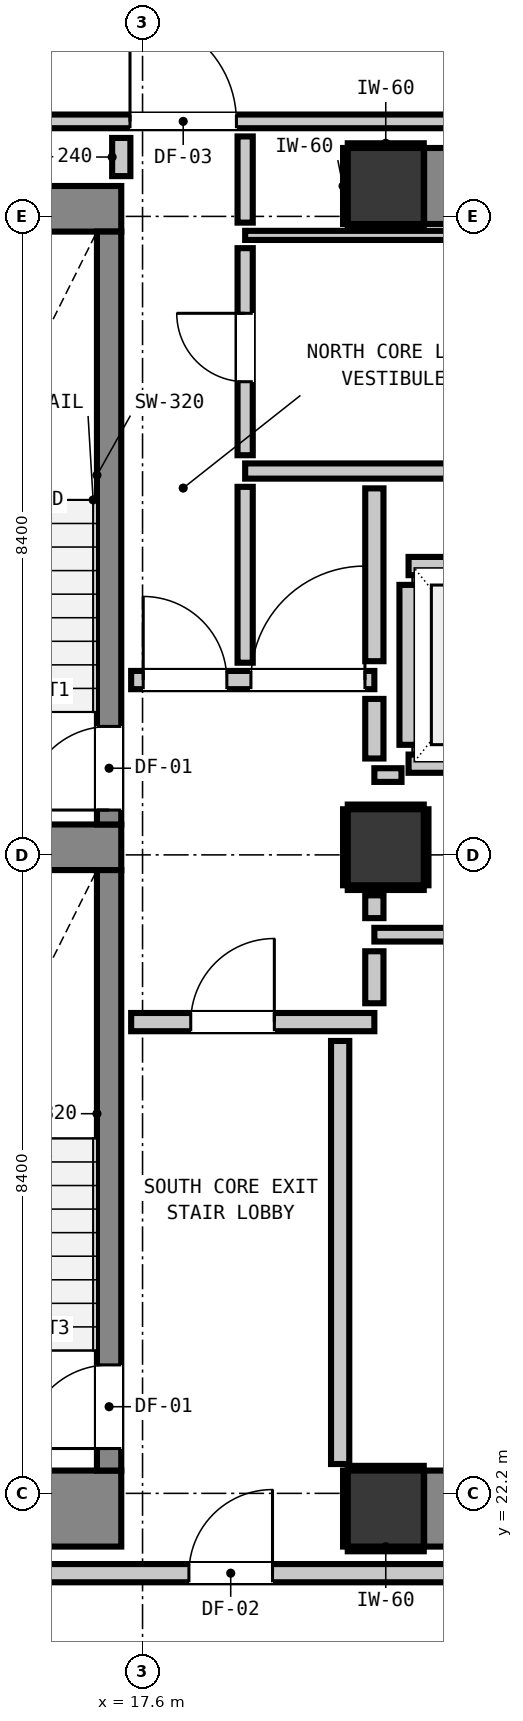
"""IFC4 building model, lengths in metres.
Left out: names, types, materials, properties, quantities, classifications, styles, units other than length and angle.
Written with IfcOpenShell. Run it as: python <this file> out.ifc"""

import sys

from ifc_helpers import new_model, si_unit, direction, frame, frame_2d, origin, origin_2d, place, context, subcontext, project, spatial, rectangle, extrude, element, fill, save


model = new_model("IFC4")
c1 = context("Model", 3, precision=1e-05, world=origin(), true_north=direction((0.0, 1.0)))
c2 = subcontext(c1, "Body", "Model", "MODEL_VIEW")
j1 = project(units=[si_unit("LENGTHUNIT", "METRE"), si_unit("PLANEANGLEUNIT", "RADIAN")], contexts=[c1])
p1 = place(None, origin())
s1 = spatial("IfcSite", under=j1, at=p1, CompositionType="ELEMENT")
p2 = place(p1, origin())
s2 = spatial("IfcBuilding", under=s1, at=p2, CompositionType="ELEMENT")
p3 = place(p2, frame((0.0, 0.0, 109.4)))
s3 = spatial("IfcBuildingStorey", under=s2, at=p3, CompositionType="ELEMENT", Elevation=109.4)
for number, where, z_axis, x_axis in (
    (1, (20.8, 22.0, 0.0), (0.0, 0.0, 1.0), (1.0, 0.0, 0.0)),
    (2, (20.8, 39.4, 0.0), (0.0, 0.0, 1.0), (1.0, 0.0, 0.0)),
):
    element("IfcColumn", number, at=place(p3, frame(where, z_axis=z_axis, x_axis=x_axis)), inside=s3, PredefinedType="COLUMN", context=c2, shape_type="SweptSolid", body=[
        extrude(rectangle(XDim=1.0, YDim=1.0, at=origin_2d()), origin(), (0.0, 0.0, 1.0), 3.32),
    ])
p4 = place(p3, frame((13.24, 22.0, 0.0), z_axis=(0.0, 0.0, 1.0), x_axis=(1.0, 0.0, 0.0)))
e3 = element("IfcWall", 3, at=p4, inside=s3, PredefinedType="SHEAR", context=c2, shape_type="SweptSolid", body=[
    extrude(rectangle(XDim=4.08, YDim=1.0, at=frame_2d((2.04, 0.0))), origin(), (0.0, 0.0, 1.0), 3.32),
])
p5 = place(p3, frame((13.24, 39.1, 0.0), z_axis=(0.0, 0.0, 1.0), x_axis=(1.0, 0.0, 0.0)))
e4 = element("IfcWall", 4, at=p5, inside=s3, PredefinedType="SHEAR", context=c2, shape_type="SweptSolid", body=[
    extrude(rectangle(XDim=4.08, YDim=0.6, at=frame_2d((2.04, 0.0))), origin(), (0.0, 0.0, 1.0), 3.32),
])
p6 = place(p3, frame((13.905, 30.7, 0.0), z_axis=(0.0, 0.0, 1.0), x_axis=(1.0, 0.0, 0.0)))
e5 = element("IfcWall", 5, at=p6, inside=s3, PredefinedType="SHEAR", context=c2, shape_type="SweptSolid", body=[
    extrude(rectangle(XDim=3.415, YDim=0.6, at=frame_2d((1.708, 0.0))), origin(), (0.0, 0.0, 1.0), 3.32),
])
for number, where, z_axis, x_axis in (
    (6, (21.305, 22.0, 0.0), (0.0, 0.0, 1.0), (1.0, 0.0, 0.0)),
    (7, (21.305, 39.4, 0.0), (0.0, 0.0, 1.0), (1.0, 0.0, 0.0)),
):
    element("IfcWall", number, at=place(p3, frame(where, z_axis=z_axis, x_axis=x_axis)), inside=s3, PredefinedType="SHEAR", context=c2, shape_type="SweptSolid", body=[
        extrude(rectangle(XDim=7.39, YDim=1.0, at=frame_2d((3.695, 0.0))), origin(), (0.0, 0.0, 1.0), 3.32),
    ])
p7 = place(p3, frame((17.16, 31.0, 0.0), z_axis=(0.0, 0.0, 1.0), x_axis=(0.0, 1.0, 0.0)))
e8 = element("IfcWall", 8, at=p7, inside=s3, PredefinedType="SHEAR", context=c2, shape_type="SweptSolid", body=[
    extrude(rectangle(XDim=7.8, YDim=0.32, at=frame_2d((3.9, 0.0))), origin(), (0.0, 0.0, 1.0), 3.32),
])
p8 = place(p7, frame((0.19, 0.0, 0.0)))
e9 = element("IfcOpeningElement", 9, at=p8, cuts=e8, PredefinedType="OPENING", context=c2, shape_type="SweptSolid", body=[
    extrude(rectangle(XDim=1.1, YDim=2.15, at=frame_2d((0.55, 1.075))), frame((0.0, 0.17, 0.0), z_axis=(0.0, -1.0, 0.0), x_axis=(1.0, 0.0, 0.0)), (0.0, 0.0, 1.0), 0.34),
])
p9 = place(p3, frame((17.16, 22.5, 0.0), z_axis=(0.0, 0.0, 1.0), x_axis=(0.0, 1.0, 0.0)))
e10 = element("IfcWall", 10, at=p9, inside=s3, PredefinedType="SHEAR", context=c2, shape_type="SweptSolid", body=[
    extrude(rectangle(XDim=7.9, YDim=0.32, at=frame_2d((3.95, 0.0))), origin(), (0.0, 0.0, 1.0), 3.32),
])
p10 = place(p9, frame((0.29, 0.0, 0.0)))
e11 = element("IfcOpeningElement", 11, at=p10, cuts=e10, PredefinedType="OPENING", context=c2, shape_type="SweptSolid", body=[
    extrude(rectangle(XDim=1.1, YDim=2.15, at=frame_2d((0.55, 1.075))), frame((0.0, 0.17, 0.0), z_axis=(0.0, -1.0, 0.0), x_axis=(1.0, 0.0, 0.0)), (0.0, 0.0, 1.0), 0.34),
])
p11 = place(p3, frame((20.8, 30.7, 0.0), z_axis=(0.0, 0.0, 1.0), x_axis=(1.0, 0.0, 0.0)))
e12 = element("IfcColumn", 12, at=p11, inside=s3, PredefinedType="COLUMN", context=c2, shape_type="SweptSolid", body=[
    extrude(rectangle(XDim=1.0, YDim=1.0, at=origin_2d()), origin(), (0.0, 0.0, 1.0), 3.32),
])
for number, where, z_axis, x_axis in (
    (13, (21.1, 31.8, 0.0), (0.0, 0.0, 1.0), (1.0, 0.0, 0.0)),
    (14, (21.1, 34.4, 0.0), (0.0, 0.0, 1.0), (1.0, 0.0, 0.0)),
):
    element("IfcWall", number, at=place(p3, frame(where, z_axis=z_axis, x_axis=x_axis)), inside=s3, PredefinedType="PARTITIONING", context=c2, shape_type="SweptSolid", body=[
        extrude(rectangle(XDim=2.2, YDim=0.24, at=frame_2d((1.1, 0.0))), origin(), (0.0, 0.0, 1.0), 3.08),
    ])
p12 = place(p3, frame((21.1, 32.048, 0.0), z_axis=(0.0, 0.0, 1.0), x_axis=(0.0, 1.0, 0.0)))
e15 = element("IfcWall", 15, at=p12, inside=s3, PredefinedType="PARTITIONING", context=c2, shape_type="SweptSolid", body=[
    extrude(rectangle(XDim=2.104, YDim=0.24, at=frame_2d((1.052, 0.0))), origin(), (0.0, 0.0, 1.0), 2.315),
])
p13 = place(p3, frame((3.207, 21.15, 0.0), z_axis=(0.0, 0.0, 1.0), x_axis=(1.0, 0.0, 0.0)))
e16 = element("IfcWall", 16, at=p13, inside=s3, PredefinedType="PARTITIONING", context=c2, shape_type="SweptSolid", body=[
    extrude(rectangle(XDim=39.386, YDim=0.24, at=frame_2d((19.693, 0.0))), origin(), (0.0, 0.0, 1.0), 3.08),
])
p14 = place(p13, frame((15.003, 0.0, 0.0)))
e17 = element("IfcOpeningElement", 17, at=p14, cuts=e16, PredefinedType="OPENING", context=c2, shape_type="SweptSolid", body=[
    extrude(rectangle(XDim=1.1, YDim=2.15, at=frame_2d((0.55, 1.075))), frame((0.0, 0.13, 0.0), z_axis=(0.0, -1.0, 0.0), x_axis=(1.0, 0.0, 0.0)), (0.0, 0.0, 1.0), 0.26),
])
p15 = place(p13, frame((7.243, 0.0, 0.0)))
e18 = element("IfcOpeningElement", 18, at=p15, cuts=e16, PredefinedType="OPENING", context=c2, shape_type="SweptSolid", body=[
    extrude(rectangle(XDim=1.4, YDim=2.15, at=frame_2d((0.7, 1.075))), frame((0.0, 0.13, 0.0), z_axis=(0.0, -1.0, 0.0), x_axis=(1.0, 0.0, 0.0)), (0.0, 0.0, 1.0), 0.26),
])
p16 = place(p13, frame((34.843, 0.0, 0.0)))
e19 = element("IfcOpeningElement", 19, at=p16, cuts=e16, PredefinedType="OPENING", context=c2, shape_type="SweptSolid", body=[
    extrude(rectangle(XDim=1.4, YDim=2.15, at=frame_2d((0.7, 1.075))), frame((0.0, 0.13, 0.0), z_axis=(0.0, -1.0, 0.0), x_axis=(1.0, 0.0, 0.0)), (0.0, 0.0, 1.0), 0.26),
])
p17 = place(p3, frame((17.45, 28.4, 0.0), z_axis=(0.0, 0.0, 1.0), x_axis=(1.0, 0.0, 0.0)))
e20 = element("IfcWall", 20, at=p17, inside=s3, PredefinedType="PARTITIONING", context=c2, shape_type="SweptSolid", body=[
    extrude(rectangle(XDim=3.2, YDim=0.24, at=frame_2d((1.6, 0.0))), origin(), (0.0, 0.0, 1.0), 3.08),
])
p18 = place(p17, frame((0.784, 0.0, 0.0)))
e21 = element("IfcOpeningElement", 21, at=p18, cuts=e20, PredefinedType="OPENING", context=c2, shape_type="SweptSolid", body=[
    extrude(rectangle(XDim=1.1, YDim=2.15, at=frame_2d((0.55, 1.075))), frame((0.0, 0.13, 0.0), z_axis=(0.0, -1.0, 0.0), x_axis=(1.0, 0.0, 0.0)), (0.0, 0.0, 1.0), 0.26),
])
p19 = place(p3, frame((17.45, 32.9, 0.0), z_axis=(0.0, 0.0, 1.0), x_axis=(1.0, 0.0, 0.0)))
e22 = element("IfcWall", 22, at=p19, inside=s3, PredefinedType="PARTITIONING", context=c2, shape_type="SweptSolid", body=[
    extrude(rectangle(XDim=3.2, YDim=0.24, at=frame_2d((1.6, 0.0))), origin(), (0.0, 0.0, 1.0), 3.08),
])
p20 = place(p19, frame((0.159, 0.0, 0.0)))
e23 = element("IfcOpeningElement", 23, at=p20, cuts=e22, PredefinedType="OPENING", context=c2, shape_type="SweptSolid", body=[
    extrude(rectangle(XDim=1.1, YDim=2.15, at=frame_2d((0.55, 1.075))), frame((0.0, 0.13, 0.0), z_axis=(0.0, -1.0, 0.0), x_axis=(1.0, 0.0, 0.0)), (0.0, 0.0, 1.0), 0.26),
])
p21 = place(p19, frame((1.576, 0.0, 0.0)))
e24 = element("IfcOpeningElement", 24, at=p21, cuts=e22, PredefinedType="OPENING", context=c2, shape_type="SweptSolid", body=[
    extrude(rectangle(XDim=1.5, YDim=2.15, at=frame_2d((0.75, 1.075))), frame((0.0, 0.13, 0.0), z_axis=(0.0, -1.0, 0.0), x_axis=(1.0, 0.0, 0.0)), (0.0, 0.0, 1.0), 0.26),
])
p22 = place(p3, frame((18.95, 35.65, 0.0), z_axis=(0.0, 0.0, 1.0), x_axis=(1.0, 0.0, 0.0)))
e25 = element("IfcWall", 25, at=p22, inside=s3, PredefinedType="PARTITIONING", context=c2, shape_type="SweptSolid", body=[
    extrude(rectangle(XDim=11.025, YDim=0.2, at=frame_2d((5.513, 0.0))), origin(), (0.0, 0.0, 1.0), 3.08),
])
p23 = place(p3, frame((20.65, 29.55, 0.0), z_axis=(0.0, 0.0, 1.0), x_axis=(1.0, 0.0, 0.0)))
e26 = element("IfcWall", 26, at=p23, inside=s3, PredefinedType="PARTITIONING", context=c2, shape_type="SweptSolid", body=[
    extrude(rectangle(XDim=9.325, YDim=0.18, at=frame_2d((4.663, 0.0))), origin(), (0.0, 0.0, 1.0), 3.08),
])
p24 = place(p3, frame((20.65, 31.65, 0.0), z_axis=(0.0, 0.0, 1.0), x_axis=(1.0, 0.0, 0.0)))
e27 = element("IfcWall", 27, at=p24, inside=s3, PredefinedType="PARTITIONING", context=c2, shape_type="SweptSolid", body=[
    extrude(rectangle(XDim=0.357, YDim=0.18, at=frame_2d((0.179, 0.0))), origin(), (0.0, 0.0, 1.0), 3.08),
])
p25 = place(p3, frame((12.979, 40.25, 0.0), z_axis=(0.0, 0.0, 1.0), x_axis=(1.0, 0.0, 0.0)))
e28 = element("IfcWall", 28, at=p25, inside=s3, PredefinedType="PARTITIONING", context=c2, shape_type="SweptSolid", body=[
    extrude(rectangle(XDim=29.614, YDim=0.18, at=frame_2d((14.807, 0.0))), origin(), (0.0, 0.0, 1.0), 3.08),
])
p26 = place(p25, frame((4.456, 0.0, 0.0)))
e29 = element("IfcOpeningElement", 29, at=p26, cuts=e28, PredefinedType="OPENING", context=c2, shape_type="SweptSolid", body=[
    extrude(rectangle(XDim=1.4, YDim=2.15, at=frame_2d((0.7, 1.075))), frame((0.0, 0.1, 0.0), z_axis=(0.0, -1.0, 0.0), x_axis=(1.0, 0.0, 0.0)), (0.0, 0.0, 1.0), 0.2),
])
p27 = place(p25, frame((25.071, 0.0, 0.0)))
e30 = element("IfcOpeningElement", 30, at=p27, cuts=e28, PredefinedType="OPENING", context=c2, shape_type="SweptSolid", body=[
    extrude(rectangle(XDim=1.4, YDim=2.15, at=frame_2d((0.7, 1.075))), frame((0.0, 0.1, 0.0), z_axis=(0.0, -1.0, 0.0), x_axis=(1.0, 0.0, 0.0)), (0.0, 0.0, 1.0), 0.2),
])
p28 = place(p3, frame((18.95, 38.75, 0.0), z_axis=(0.0, 0.0, 1.0), x_axis=(1.0, 0.0, 0.0)))
e31 = element("IfcWall", 31, at=p28, inside=s3, PredefinedType="PARTITIONING", context=c2, shape_type="SweptSolid", body=[
    extrude(rectangle(XDim=13.56, YDim=0.12, at=frame_2d((6.78, 0.0))), origin(), (0.0, 0.0, 1.0), 3.08),
])
p29 = place(p3, frame((17.32, 39.53, 0.0), z_axis=(0.0, 0.0, 1.0), x_axis=(0.0, 1.0, 0.0)))
e32 = element("IfcWall", 32, at=p29, inside=s3, PredefinedType="PARTITIONING", context=c2, shape_type="SweptSolid", body=[
    extrude(rectangle(XDim=0.502, YDim=0.24, at=frame_2d((0.251, 0.0))), origin(), (0.0, 0.0, 1.0), 3.08),
])
p30 = place(p3, frame((20.2, 22.586, 0.0), z_axis=(0.0, 0.0, 1.0), x_axis=(0.0, 1.0, 0.0)))
e33 = element("IfcWall", 33, at=p30, inside=s3, PredefinedType="PARTITIONING", context=c2, shape_type="SweptSolid", body=[
    extrude(rectangle(XDim=5.566, YDim=0.24, at=frame_2d((2.783, 0.0))), origin(), (0.0, 0.0, 1.0), 3.08),
])
p31 = place(p3, frame((20.65, 28.648, 0.0), z_axis=(0.0, 0.0, 1.0), x_axis=(0.0, 1.0, 0.0)))
e34 = element("IfcWall", 34, at=p31, inside=s3, PredefinedType="PARTITIONING", context=c2, shape_type="SweptSolid", body=[
    extrude(rectangle(XDim=0.684, YDim=0.24, at=frame_2d((0.342, 0.0))), origin(), (0.0, 0.0, 1.0), 2.315),
])
p32 = place(p3, frame((20.65, 29.768, 0.0), z_axis=(0.0, 0.0, 1.0), x_axis=(0.0, 1.0, 0.0)))
e35 = element("IfcWall", 35, at=p32, inside=s3, PredefinedType="PARTITIONING", context=c2, shape_type="SweptSolid", body=[
    extrude(rectangle(XDim=0.3, YDim=0.24, at=frame_2d((0.15, 0.0))), origin(), (0.0, 0.0, 1.0), 2.315),
])
p33 = place(p3, frame((20.65, 31.868, 0.0), z_axis=(0.0, 0.0, 1.0), x_axis=(0.0, 1.0, 0.0)))
e36 = element("IfcWall", 36, at=p33, inside=s3, PredefinedType="PARTITIONING", context=c2, shape_type="SweptSolid", body=[
    extrude(rectangle(XDim=0.784, YDim=0.24, at=frame_2d((0.392, 0.0))), origin(), (0.0, 0.0, 1.0), 2.315),
])
p34 = place(p3, frame((20.65, 33.148, 0.0), z_axis=(0.0, 0.0, 1.0), x_axis=(0.0, 1.0, 0.0)))
e37 = element("IfcWall", 37, at=p34, inside=s3, PredefinedType="PARTITIONING", context=c2, shape_type="SweptSolid", body=[
    extrude(rectangle(XDim=2.274, YDim=0.24, at=frame_2d((1.137, 0.0))), origin(), (0.0, 0.0, 1.0), 2.315),
])
p35 = place(p3, frame((18.95, 33.128, 0.0), z_axis=(0.0, 0.0, 1.0), x_axis=(0.0, 1.0, 0.0)))
e38 = element("IfcWall", 38, at=p35, inside=s3, PredefinedType="PARTITIONING", context=c2, shape_type="SweptSolid", body=[
    extrude(rectangle(XDim=2.314, YDim=0.2, at=frame_2d((1.157, 0.0))), origin(), (0.0, 0.0, 1.0), 3.08),
])
p36 = place(p3, frame((18.95, 35.858, 0.0), z_axis=(0.0, 0.0, 1.0), x_axis=(0.0, 1.0, 0.0)))
e39 = element("IfcWall", 39, at=p36, inside=s3, PredefinedType="PARTITIONING", context=c2, shape_type="SweptSolid", body=[
    extrude(rectangle(XDim=2.724, YDim=0.2, at=frame_2d((1.362, 0.0))), origin(), (0.0, 0.0, 1.0), 3.08),
])
p37 = place(p36, frame((0.967, 0.0, 0.0)))
e40 = element("IfcOpeningElement", 40, at=p37, cuts=e39, PredefinedType="OPENING", context=c2, shape_type="SweptSolid", body=[
    extrude(rectangle(XDim=0.9, YDim=2.1, at=frame_2d((0.45, 1.05))), frame((0.0, 0.11, 0.0), z_axis=(0.0, -1.0, 0.0), x_axis=(1.0, 0.0, 0.0)), (0.0, 0.0, 1.0), 0.22),
])
p38 = place(p3, frame((18.95, 38.918, 0.0), z_axis=(0.0, 0.0, 1.0), x_axis=(0.0, 1.0, 0.0)))
e41 = element("IfcWall", 41, at=p38, inside=s3, PredefinedType="PARTITIONING", context=c2, shape_type="SweptSolid", body=[
    extrude(rectangle(XDim=1.134, YDim=0.2, at=frame_2d((0.567, 0.0))), origin(), (0.0, 0.0, 1.0), 3.08),
])
for number, where, z_axis, x_axis in (
    (42, (20.3, 21.468, 0.0), (0.0, 0.0, 1.0), (1.0, 0.0, 0.0)),
    (43, (20.3, 22.532, 0.0), (0.0, 0.0, 1.0), (1.0, 0.0, 0.0)),
    (44, (20.268, 21.5, 0.0), (0.0, 0.0, 1.0), (0.0, 1.0, 0.0)),
    (45, (20.3, 38.868, 0.0), (0.0, 0.0, 1.0), (1.0, 0.0, 0.0)),
    (46, (20.3, 39.932, 0.0), (0.0, 0.0, 1.0), (1.0, 0.0, 0.0)),
    (47, (20.268, 38.9, 0.0), (0.0, 0.0, 1.0), (0.0, 1.0, 0.0)),
    (48, (20.3, 30.168, 0.0), (0.0, 0.0, 1.0), (1.0, 0.0, 0.0)),
    (49, (20.3, 31.232, 0.0), (0.0, 0.0, 1.0), (1.0, 0.0, 0.0)),
    (50, (20.268, 30.2, 0.0), (0.0, 0.0, 1.0), (0.0, 1.0, 0.0)),
    (51, (21.332, 30.2, 0.0), (0.0, 0.0, 1.0), (0.0, 1.0, 0.0)),
):
    element("IfcWall", number, at=place(p3, frame(where, z_axis=z_axis, x_axis=x_axis)), inside=s3, PredefinedType="PARTITIONING", context=c2, shape_type="SweptSolid", body=[
        extrude(rectangle(XDim=1.0, YDim=0.06, at=frame_2d((0.5, 0.0))), origin(), (0.0, 0.0, 1.0), 1.45),
    ])
p39 = place(p8, origin())
e52 = element("IfcDoor", 52, at=p39, inside=s3, OperationType="SINGLE_SWING_LEFT", PredefinedType="DOOR", context=c2, shape_type="SweptSolid", body=[
    extrude(rectangle(XDim=1.1, YDim=2.15, at=frame_2d((0.55, 1.075))), frame((0.0, 0.025, 0.0), z_axis=(0.0, -1.0, 0.0), x_axis=(1.0, 0.0, 0.0)), (0.0, 0.0, 1.0), 0.05),
])
fill(e9, e52)
p40 = place(p10, origin())
e53 = element("IfcDoor", 53, at=p40, inside=s3, OperationType="SINGLE_SWING_LEFT", PredefinedType="DOOR", context=c2, shape_type="SweptSolid", body=[
    extrude(rectangle(XDim=1.1, YDim=2.15, at=frame_2d((0.55, 1.075))), frame((0.0, 0.025, 0.0), z_axis=(0.0, -1.0, 0.0), x_axis=(1.0, 0.0, 0.0)), (0.0, 0.0, 1.0), 0.05),
])
fill(e11, e53)
p41 = place(p18, origin())
e54 = element("IfcDoor", 54, at=p41, inside=s3, OperationType="SINGLE_SWING_RIGHT", PredefinedType="DOOR", context=c2, shape_type="SweptSolid", body=[
    extrude(rectangle(XDim=1.1, YDim=2.15, at=frame_2d((0.55, 1.075))), frame((0.0, 0.025, 0.0), z_axis=(0.0, -1.0, 0.0), x_axis=(1.0, 0.0, 0.0)), (0.0, 0.0, 1.0), 0.05),
])
fill(e21, e54)
p42 = place(p20, origin())
e55 = element("IfcDoor", 55, at=p42, inside=s3, OperationType="SINGLE_SWING_LEFT", PredefinedType="DOOR", context=c2, shape_type="SweptSolid", body=[
    extrude(rectangle(XDim=1.1, YDim=2.15, at=frame_2d((0.55, 1.075))), frame((0.0, 0.025, 0.0), z_axis=(0.0, -1.0, 0.0), x_axis=(1.0, 0.0, 0.0)), (0.0, 0.0, 1.0), 0.05),
])
fill(e23, e55)
p43 = place(p14, origin())
e56 = element("IfcDoor", 56, at=p43, inside=s3, OperationType="SINGLE_SWING_RIGHT", PredefinedType="DOOR", context=c2, shape_type="SweptSolid", body=[
    extrude(rectangle(XDim=1.1, YDim=2.15, at=frame_2d((0.55, 1.075))), frame((0.0, 0.025, 0.0), z_axis=(0.0, -1.0, 0.0), x_axis=(1.0, 0.0, 0.0)), (0.0, 0.0, 1.0), 0.05),
])
fill(e17, e56)
p44 = place(p26, origin())
e57 = element("IfcDoor", 57, at=p44, inside=s3, OperationType="SINGLE_SWING_LEFT", PredefinedType="DOOR", context=c2, shape_type="SweptSolid", body=[
    extrude(rectangle(XDim=1.4, YDim=2.15, at=frame_2d((0.7, 1.075))), frame((0.0, 0.025, 0.0), z_axis=(0.0, -1.0, 0.0), x_axis=(1.0, 0.0, 0.0)), (0.0, 0.0, 1.0), 0.05),
])
fill(e29, e57)
p45 = place(p21, origin())
e58 = element("IfcDoor", 58, at=p45, inside=s3, OperationType="SINGLE_SWING_RIGHT", PredefinedType="DOOR", context=c2, shape_type="SweptSolid", body=[
    extrude(rectangle(XDim=1.5, YDim=2.15, at=frame_2d((0.75, 1.075))), frame((0.0, 0.025, 0.0), z_axis=(0.0, -1.0, 0.0), x_axis=(1.0, 0.0, 0.0)), (0.0, 0.0, 1.0), 0.05),
])
fill(e24, e58)
p46 = place(p37, origin())
e59 = element("IfcDoor", 59, at=p46, inside=s3, OperationType="SINGLE_SWING_RIGHT", PredefinedType="DOOR", context=c2, shape_type="SweptSolid", body=[
    extrude(rectangle(XDim=0.9, YDim=2.1, at=frame_2d((0.45, 1.05))), frame((0.0, 0.025, 0.0), z_axis=(0.0, -1.0, 0.0), x_axis=(1.0, 0.0, 0.0)), (0.0, 0.0, 1.0), 0.05),
])
fill(e40, e59)
save(model, sys.argv[1])
